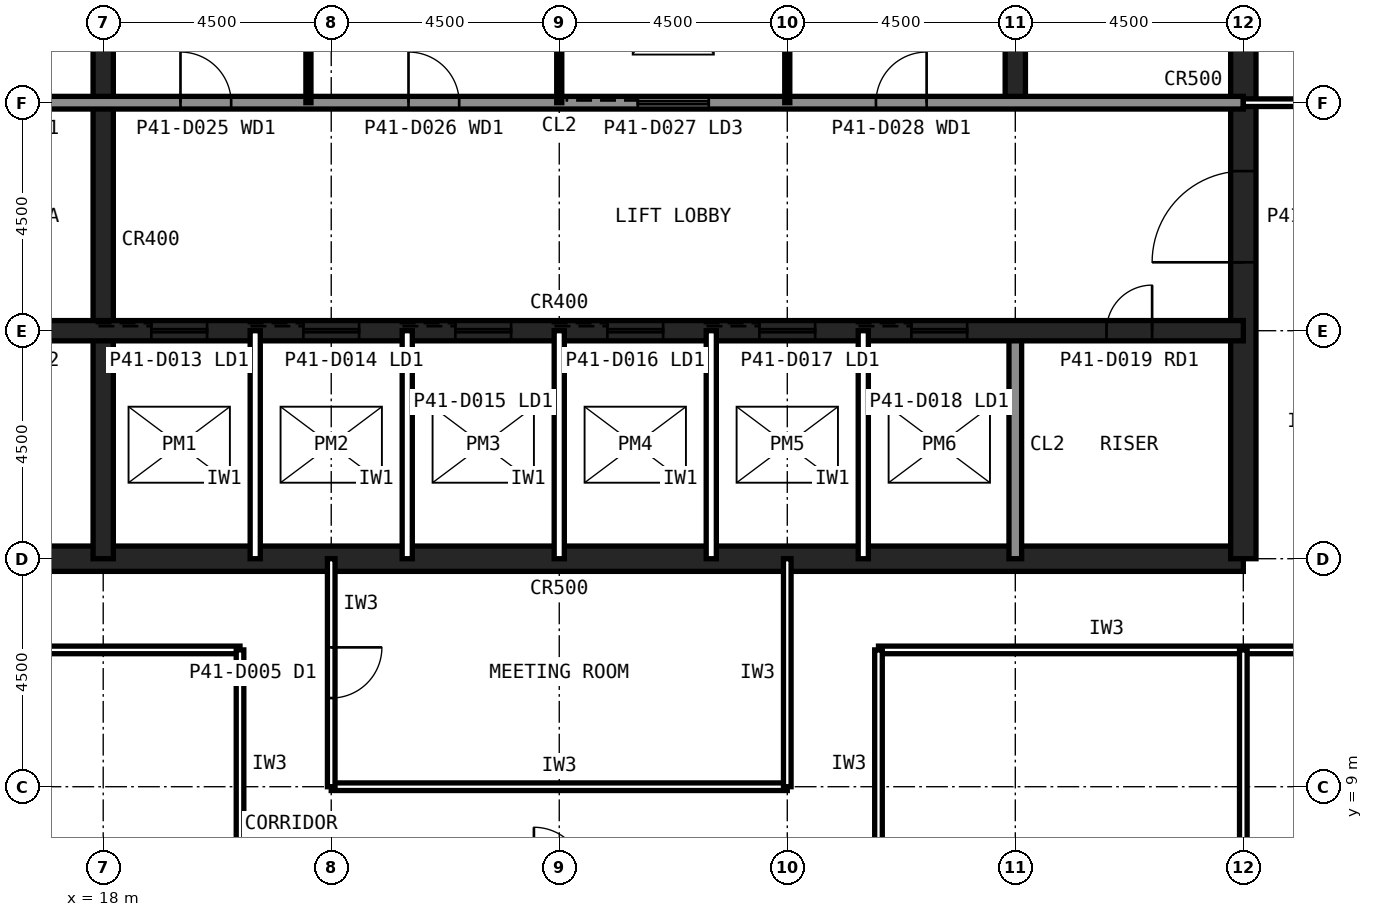
"""IFC4 building model, lengths in metres.
Left out: names, types, materials, properties, quantities, classifications, styles, units other than length and angle.
Written with IfcOpenShell. Run it as: python <this file> out.ifc"""

import sys

from ifc_helpers import new_model, si_unit, direction, frame, frame_2d, origin, place, context, subcontext, project, spatial, rectangle, extrude, element, fill, save


model = new_model("IFC4")
c1 = context("Model", 3, precision=1e-05, world=origin(), true_north=direction((0.0, 1.0)))
c2 = subcontext(c1, "Body", "Model", "MODEL_VIEW")
j1 = project(units=[si_unit("LENGTHUNIT", "METRE"), si_unit("PLANEANGLEUNIT", "RADIAN")], contexts=[c1])
p1 = place(None, origin())
s1 = spatial("IfcSite", under=j1, at=p1, CompositionType="ELEMENT")
p2 = place(p1, origin())
s2 = spatial("IfcBuilding", under=s1, at=p2, CompositionType="ELEMENT")
p3 = place(p2, frame((0.0, 0.0, 175.6)))
s3 = spatial("IfcBuildingStorey", under=s2, at=p3, CompositionType="ELEMENT", Elevation=175.6)
p4 = place(p3, frame((13.5, 13.5, 0.0), z_axis=(0.0, 0.0, 1.0), x_axis=(1.0, 0.0, 0.0)))
e1 = element("IfcWall", 1, at=p4, inside=s3, PredefinedType="SHEAR", context=c2, shape_type="SweptSolid", body=[
    extrude(rectangle(XDim=27.0, YDim=0.5, at=frame_2d((13.5, 0.0))), origin(), (0.0, 0.0, 1.0), 4.0),
])
p5 = place(p3, frame((40.5, 13.5, 0.0), z_axis=(0.0, 0.0, 1.0), x_axis=(0.0, 1.0, 0.0)))
e2 = element("IfcWall", 2, at=p5, inside=s3, PredefinedType="SHEAR", context=c2, shape_type="SweptSolid", body=[
    extrude(rectangle(XDim=27.0, YDim=0.5, at=frame_2d((13.5, 0.0))), origin(), (0.0, 0.0, 1.0), 4.0),
])
p6 = place(p5, frame((5.85, 0.0, 0.0)))
e3 = element("IfcOpeningElement", 3, at=p6, cuts=e2, PredefinedType="OPENING", context=c2, shape_type="SweptSolid", body=[
    extrude(rectangle(XDim=1.8, YDim=2.1, at=frame_2d((0.9, 1.05))), frame((0.0, 0.26, 0.0), z_axis=(0.0, -1.0, 0.0), x_axis=(1.0, 0.0, 0.0)), (0.0, 0.0, 1.0), 0.52),
])
p7 = place(p5, frame((19.65, 0.0, 0.0)))
e4 = element("IfcOpeningElement", 4, at=p7, cuts=e2, PredefinedType="OPENING", context=c2, shape_type="SweptSolid", body=[
    extrude(rectangle(XDim=1.2, YDim=2.1, at=frame_2d((0.6, 1.05))), frame((0.0, 0.26, 0.0), z_axis=(0.0, -1.0, 0.0), x_axis=(1.0, 0.0, 0.0)), (0.0, 0.0, 1.0), 0.52),
])
p8 = place(p3, frame((18.0, 13.5, 0.0), z_axis=(0.0, 0.0, 1.0), x_axis=(0.0, 1.0, 0.0)))
e5 = element("IfcWall", 5, at=p8, inside=s3, PredefinedType="SHEAR", context=c2, shape_type="SweptSolid", body=[
    extrude(rectangle(XDim=18.0, YDim=0.4, at=frame_2d((9.0, 0.0))), origin(), (0.0, 0.0, 1.0), 4.0),
])
p9 = place(p3, frame((36.0, 13.5, 0.0), z_axis=(0.0, 0.0, 1.0), x_axis=(0.0, 1.0, 0.0)))
e6 = element("IfcWall", 6, at=p9, inside=s3, PredefinedType="SOLIDWALL", context=c2, shape_type="SweptSolid", body=[
    extrude(rectangle(XDim=4.5, YDim=0.25, at=frame_2d((2.25, 0.0))), origin(), (0.0, 0.0, 1.0), 3.84),
])
p10 = place(p3, frame((36.0, 22.5, 0.0), z_axis=(0.0, 0.0, 1.0), x_axis=(0.0, 1.0, 0.0)))
e7 = element("IfcWall", 7, at=p10, inside=s3, PredefinedType="SHEAR", context=c2, shape_type="SweptSolid", body=[
    extrude(rectangle(XDim=18.0, YDim=0.4, at=frame_2d((9.0, 0.0))), origin(), (0.0, 0.0, 1.0), 4.0),
])
p11 = place(p3, frame((13.5, 18.0, 0.0), z_axis=(0.0, 0.0, 1.0), x_axis=(1.0, 0.0, 0.0)))
e8 = element("IfcWall", 8, at=p11, inside=s3, PredefinedType="SHEAR", context=c2, shape_type="SweptSolid", body=[
    extrude(rectangle(XDim=27.0, YDim=0.4, at=frame_2d((13.5, 0.0))), origin(), (0.0, 0.0, 1.0), 4.0),
])
p12 = place(p11, frame((24.3, 0.0, 0.0)))
e9 = element("IfcOpeningElement", 9, at=p12, cuts=e8, PredefinedType="OPENING", context=c2, shape_type="SweptSolid", body=[
    extrude(rectangle(XDim=0.9, YDim=2.1, at=frame_2d((0.45, 1.05))), frame((0.0, 0.21, 0.0), z_axis=(0.0, -1.0, 0.0), x_axis=(1.0, 0.0, 0.0)), (0.0, 0.0, 1.0), 0.42),
])
p13 = place(p11, frame((5.45, 0.0, 0.0)))
e10 = element("IfcOpeningElement", 10, at=p13, cuts=e8, PredefinedType="OPENING", context=c2, shape_type="SweptSolid", body=[
    extrude(rectangle(XDim=1.1, YDim=2.1, at=frame_2d((0.55, 1.05))), frame((0.0, 0.21, 0.0), z_axis=(0.0, -1.0, 0.0), x_axis=(1.0, 0.0, 0.0)), (0.0, 0.0, 1.0), 0.42),
])
p14 = place(p11, frame((8.45, 0.0, 0.0)))
e11 = element("IfcOpeningElement", 11, at=p14, cuts=e8, PredefinedType="OPENING", context=c2, shape_type="SweptSolid", body=[
    extrude(rectangle(XDim=1.1, YDim=2.1, at=frame_2d((0.55, 1.05))), frame((0.0, 0.21, 0.0), z_axis=(0.0, -1.0, 0.0), x_axis=(1.0, 0.0, 0.0)), (0.0, 0.0, 1.0), 0.42),
])
p15 = place(p11, frame((11.45, 0.0, 0.0)))
e12 = element("IfcOpeningElement", 12, at=p15, cuts=e8, PredefinedType="OPENING", context=c2, shape_type="SweptSolid", body=[
    extrude(rectangle(XDim=1.1, YDim=2.1, at=frame_2d((0.55, 1.05))), frame((0.0, 0.21, 0.0), z_axis=(0.0, -1.0, 0.0), x_axis=(1.0, 0.0, 0.0)), (0.0, 0.0, 1.0), 0.42),
])
p16 = place(p11, frame((14.45, 0.0, 0.0)))
e13 = element("IfcOpeningElement", 13, at=p16, cuts=e8, PredefinedType="OPENING", context=c2, shape_type="SweptSolid", body=[
    extrude(rectangle(XDim=1.1, YDim=2.1, at=frame_2d((0.55, 1.05))), frame((0.0, 0.21, 0.0), z_axis=(0.0, -1.0, 0.0), x_axis=(1.0, 0.0, 0.0)), (0.0, 0.0, 1.0), 0.42),
])
p17 = place(p11, frame((17.45, 0.0, 0.0)))
e14 = element("IfcOpeningElement", 14, at=p17, cuts=e8, PredefinedType="OPENING", context=c2, shape_type="SweptSolid", body=[
    extrude(rectangle(XDim=1.1, YDim=2.1, at=frame_2d((0.55, 1.05))), frame((0.0, 0.21, 0.0), z_axis=(0.0, -1.0, 0.0), x_axis=(1.0, 0.0, 0.0)), (0.0, 0.0, 1.0), 0.42),
])
p18 = place(p11, frame((20.45, 0.0, 0.0)))
e15 = element("IfcOpeningElement", 15, at=p18, cuts=e8, PredefinedType="OPENING", context=c2, shape_type="SweptSolid", body=[
    extrude(rectangle(XDim=1.1, YDim=2.1, at=frame_2d((0.55, 1.05))), frame((0.0, 0.21, 0.0), z_axis=(0.0, -1.0, 0.0), x_axis=(1.0, 0.0, 0.0)), (0.0, 0.0, 1.0), 0.42),
])
p19 = place(p11, frame((1.6, 0.0, 0.0)))
e16 = element("IfcOpeningElement", 16, at=p19, cuts=e8, PredefinedType="OPENING", context=c2, shape_type="SweptSolid", body=[
    extrude(rectangle(XDim=1.3, YDim=2.2, at=frame_2d((0.65, 1.1))), frame((0.0, 0.21, 0.0), z_axis=(0.0, -1.0, 0.0), x_axis=(1.0, 0.0, 0.0)), (0.0, 0.0, 1.0), 0.42),
])
p20 = place(p3, frame((13.5, 22.5, 0.0), z_axis=(0.0, 0.0, 1.0), x_axis=(1.0, 0.0, 0.0)))
e17 = element("IfcWall", 17, at=p20, inside=s3, PredefinedType="SOLIDWALL", context=c2, shape_type="SweptSolid", body=[
    extrude(rectangle(XDim=27.0, YDim=0.25, at=frame_2d((13.5, 0.0))), origin(), (0.0, 0.0, 1.0), 3.84),
])
p21 = place(p20, frame((1.65, 0.0, 0.0)))
e18 = element("IfcOpeningElement", 18, at=p21, cuts=e17, PredefinedType="OPENING", context=c2, shape_type="SweptSolid", body=[
    extrude(rectangle(XDim=1.2, YDim=2.1, at=frame_2d((0.6, 1.05))), frame((0.0, 0.135, 0.0), z_axis=(0.0, -1.0, 0.0), x_axis=(1.0, 0.0, 0.0)), (0.0, 0.0, 1.0), 0.27),
])
p22 = place(p20, frame((6.025, 0.0, 0.0)))
e19 = element("IfcOpeningElement", 19, at=p22, cuts=e17, PredefinedType="OPENING", context=c2, shape_type="SweptSolid", body=[
    extrude(rectangle(XDim=1.0, YDim=2.1, at=frame_2d((0.5, 1.05))), frame((0.0, 0.135, 0.0), z_axis=(0.0, -1.0, 0.0), x_axis=(1.0, 0.0, 0.0)), (0.0, 0.0, 1.0), 0.27),
])
p23 = place(p20, frame((10.525, 0.0, 0.0)))
e20 = element("IfcOpeningElement", 20, at=p23, cuts=e17, PredefinedType="OPENING", context=c2, shape_type="SweptSolid", body=[
    extrude(rectangle(XDim=1.0, YDim=2.1, at=frame_2d((0.5, 1.05))), frame((0.0, 0.135, 0.0), z_axis=(0.0, -1.0, 0.0), x_axis=(1.0, 0.0, 0.0)), (0.0, 0.0, 1.0), 0.27),
])
p24 = place(p20, frame((19.75, 0.0, 0.0)))
e21 = element("IfcOpeningElement", 21, at=p24, cuts=e17, PredefinedType="OPENING", context=c2, shape_type="SweptSolid", body=[
    extrude(rectangle(XDim=1.0, YDim=2.1, at=frame_2d((0.5, 1.05))), frame((0.0, 0.135, 0.0), z_axis=(0.0, -1.0, 0.0), x_axis=(1.0, 0.0, 0.0)), (0.0, 0.0, 1.0), 0.27),
])
p25 = place(p20, frame((15.05, 0.0, 0.0)))
e22 = element("IfcOpeningElement", 22, at=p25, cuts=e17, PredefinedType="OPENING", context=c2, shape_type="SweptSolid", body=[
    extrude(rectangle(XDim=1.4, YDim=2.4, at=frame_2d((0.7, 1.2))), frame((0.0, 0.135, 0.0), z_axis=(0.0, -1.0, 0.0), x_axis=(1.0, 0.0, 0.0)), (0.0, 0.0, 1.0), 0.27),
])
for number, where, z_axis, x_axis in (
    (23, (21.0, 13.5, 0.0), (0.0, 0.0, 1.0), (0.0, 1.0, 0.0)),
    (24, (24.0, 13.5, 0.0), (0.0, 0.0, 1.0), (0.0, 1.0, 0.0)),
    (25, (27.0, 13.5, 0.0), (0.0, 0.0, 1.0), (0.0, 1.0, 0.0)),
    (26, (30.0, 13.5, 0.0), (0.0, 0.0, 1.0), (0.0, 1.0, 0.0)),
    (27, (33.0, 13.5, 0.0), (0.0, 0.0, 1.0), (0.0, 1.0, 0.0)),
):
    element("IfcWall", number, at=place(p3, frame(where, z_axis=z_axis, x_axis=x_axis)), inside=s3, PredefinedType="PARTITIONING", context=c2, shape_type="SweptSolid", body=[
        extrude(rectangle(XDim=4.5, YDim=0.2, at=frame_2d((2.25, 0.0))), origin(), (0.0, 0.0, 1.0), 3.84),
    ])
for number, where, z_axis, x_axis in (
    (28, (22.05, 22.5, 0.0), (0.0, 0.0, 1.0), (0.0, 1.0, 0.0)),
    (29, (27.0, 22.5, 0.0), (0.0, 0.0, 1.0), (0.0, 1.0, 0.0)),
    (30, (31.5, 22.5, 0.0), (0.0, 0.0, 1.0), (0.0, 1.0, 0.0)),
):
    element("IfcWall", number, at=place(p3, frame(where, z_axis=z_axis, x_axis=x_axis)), inside=s3, PredefinedType="PLUMBINGWALL", context=c2, shape_type="SweptSolid", body=[
        extrude(rectangle(XDim=9.0, YDim=0.1, at=frame_2d((4.5, 0.0))), origin(), (0.0, 0.0, 1.0), 3.84),
    ])
for number, where, z_axis, x_axis in (
    (31, (11.7, 11.7, 0.0), (0.0, 0.0, 1.0), (1.0, 0.0, 0.0)),
    (32, (33.3, 11.7, 0.0), (0.0, 0.0, 1.0), (1.0, 0.0, 0.0)),
):
    element("IfcWall", number, at=place(p3, frame(where, z_axis=z_axis, x_axis=x_axis)), inside=s3, PredefinedType="PARTITIONING", context=c2, shape_type="SweptSolid", body=[
        extrude(rectangle(XDim=9.0, YDim=0.15, at=frame_2d((4.5, 0.0))), origin(), (0.0, 0.0, 1.0), 3.84),
    ])
for number, where, z_axis, x_axis in (
    (33, (20.7, 11.7, 0.0), (0.0, 0.0, 1.0), (0.0, -1.0, 0.0)),
    (34, (33.3, 7.2, 0.0), (0.0, 0.0, 1.0), (0.0, 1.0, 0.0)),
):
    element("IfcWall", number, at=place(p3, frame(where, z_axis=z_axis, x_axis=x_axis)), inside=s3, PredefinedType="PARTITIONING", context=c2, shape_type="SweptSolid", body=[
        extrude(rectangle(XDim=4.5, YDim=0.15, at=frame_2d((2.25, 0.0))), origin(), (0.0, 0.0, 1.0), 3.84),
    ])
p26 = place(p3, frame((22.5, 9.0, 0.0), z_axis=(0.0, 0.0, 1.0), x_axis=(1.0, 0.0, 0.0)))
e35 = element("IfcWall", 35, at=p26, inside=s3, PredefinedType="PARTITIONING", context=c2, shape_type="SweptSolid", body=[
    extrude(rectangle(XDim=9.0, YDim=0.15, at=frame_2d((4.5, 0.0))), origin(), (0.0, 0.0, 1.0), 3.84),
])
p27 = place(p3, frame((31.5, 9.0, 0.0), z_axis=(0.0, 0.0, 1.0), x_axis=(0.0, 1.0, 0.0)))
e36 = element("IfcWall", 36, at=p27, inside=s3, PredefinedType="PARTITIONING", context=c2, shape_type="SweptSolid", body=[
    extrude(rectangle(XDim=4.5, YDim=0.15, at=frame_2d((2.25, 0.0))), origin(), (0.0, 0.0, 1.0), 2.989),
])
p28 = place(p3, frame((22.5, 13.5, 0.0), z_axis=(0.0, 0.0, 1.0), x_axis=(0.0, -1.0, 0.0)))
e37 = element("IfcWall", 37, at=p28, inside=s3, PredefinedType="PARTITIONING", context=c2, shape_type="SweptSolid", body=[
    extrude(rectangle(XDim=4.5, YDim=0.15, at=frame_2d((2.25, 0.0))), origin(), (0.0, 0.0, 1.0), 2.989),
])
p29 = place(p28, frame((1.75, 0.0, 0.0)))
e38 = element("IfcOpeningElement", 38, at=p29, cuts=e37, PredefinedType="OPENING", context=c2, shape_type="SweptSolid", body=[
    extrude(rectangle(XDim=1.0, YDim=2.1, at=frame_2d((0.5, 1.05))), frame((0.0, 0.085, 0.0), z_axis=(0.0, -1.0, 0.0), x_axis=(1.0, 0.0, 0.0)), (0.0, 0.0, 1.0), 0.17),
])
p30 = place(p3, frame((40.5, 22.5, 0.0), z_axis=(0.0, 0.0, 1.0), x_axis=(1.0, 0.0, 0.0)))
e39 = element("IfcWall", 39, at=p30, inside=s3, PredefinedType="PARTITIONING", context=c2, shape_type="SweptSolid", body=[
    extrude(rectangle(XDim=3.0, YDim=0.15, at=frame_2d((1.5, 0.0))), origin(), (0.0, 0.0, 1.0), 2.989),
])
p31 = place(p3, frame((40.5, 0.395, 0.0), z_axis=(0.0, 0.0, 1.0), x_axis=(0.0, 1.0, 0.0)))
e40 = element("IfcWall", 40, at=p31, inside=s3, PredefinedType="PARTITIONING", context=c2, shape_type="SweptSolid", body=[
    extrude(rectangle(XDim=11.305, YDim=0.15, at=frame_2d((5.652, 0.0))), origin(), (0.0, 0.0, 1.0), 2.989),
])
p32 = place(p31, frame((5.153, 0.0, 0.0)))
e41 = element("IfcOpeningElement", 41, at=p32, cuts=e40, PredefinedType="OPENING", context=c2, shape_type="SweptSolid", body=[
    extrude(rectangle(XDim=1.0, YDim=2.1, at=frame_2d((0.5, 1.05))), frame((0.0, 0.085, 0.0), z_axis=(0.0, -1.0, 0.0), x_axis=(1.0, 0.0, 0.0)), (0.0, 0.0, 1.0), 0.17),
])
p33 = place(p6, origin())
e42 = element("IfcDoor", 42, at=p33, inside=s3, OperationType="SINGLE_SWING_LEFT", PredefinedType="DOOR", context=c2, shape_type="SweptSolid", body=[
    extrude(rectangle(XDim=1.8, YDim=2.1, at=frame_2d((0.9, 1.05))), frame((0.0, 0.025, 0.0), z_axis=(0.0, -1.0, 0.0), x_axis=(1.0, 0.0, 0.0)), (0.0, 0.0, 1.0), 0.05),
])
fill(e3, e42)
p34 = place(p22, origin())
e43 = element("IfcDoor", 43, at=p34, inside=s3, OperationType="SINGLE_SWING_LEFT", PredefinedType="DOOR", context=c2, shape_type="SweptSolid", body=[
    extrude(rectangle(XDim=1.0, YDim=2.1, at=frame_2d((0.5, 1.05))), frame((0.0, 0.025, 0.0), z_axis=(0.0, -1.0, 0.0), x_axis=(1.0, 0.0, 0.0)), (0.0, 0.0, 1.0), 0.05),
])
fill(e19, e43)
p35 = place(p23, origin())
e44 = element("IfcDoor", 44, at=p35, inside=s3, OperationType="SINGLE_SWING_LEFT", PredefinedType="DOOR", context=c2, shape_type="SweptSolid", body=[
    extrude(rectangle(XDim=1.0, YDim=2.1, at=frame_2d((0.5, 1.05))), frame((0.0, 0.025, 0.0), z_axis=(0.0, -1.0, 0.0), x_axis=(1.0, 0.0, 0.0)), (0.0, 0.0, 1.0), 0.05),
])
fill(e20, e44)
p36 = place(p24, origin())
e45 = element("IfcDoor", 45, at=p36, inside=s3, OperationType="SINGLE_SWING_RIGHT", PredefinedType="DOOR", context=c2, shape_type="SweptSolid", body=[
    extrude(rectangle(XDim=1.0, YDim=2.1, at=frame_2d((0.5, 1.05))), frame((0.0, 0.025, 0.0), z_axis=(0.0, -1.0, 0.0), x_axis=(1.0, 0.0, 0.0)), (0.0, 0.0, 1.0), 0.05),
])
fill(e21, e45)
p37 = place(p12, origin())
e46 = element("IfcDoor", 46, at=p37, inside=s3, OperationType="SINGLE_SWING_RIGHT", PredefinedType="DOOR", context=c2, shape_type="SweptSolid", body=[
    extrude(rectangle(XDim=0.9, YDim=2.1, at=frame_2d((0.45, 1.05))), frame((0.0, 0.025, 0.0), z_axis=(0.0, -1.0, 0.0), x_axis=(1.0, 0.0, 0.0)), (0.0, 0.0, 1.0), 0.05),
])
fill(e9, e46)
p38 = place(p13, origin())
e47 = element("IfcDoor", 47, at=p38, inside=s3, OperationType="SLIDING_TO_LEFT", PredefinedType="DOOR", context=c2, shape_type="SweptSolid", body=[
    extrude(rectangle(XDim=1.1, YDim=2.1, at=frame_2d((0.55, 1.05))), frame((0.0, 0.025, 0.0), z_axis=(0.0, -1.0, 0.0), x_axis=(1.0, 0.0, 0.0)), (0.0, 0.0, 1.0), 0.05),
])
fill(e10, e47)
p39 = place(p14, origin())
e48 = element("IfcDoor", 48, at=p39, inside=s3, OperationType="SLIDING_TO_LEFT", PredefinedType="DOOR", context=c2, shape_type="SweptSolid", body=[
    extrude(rectangle(XDim=1.1, YDim=2.1, at=frame_2d((0.55, 1.05))), frame((0.0, 0.025, 0.0), z_axis=(0.0, -1.0, 0.0), x_axis=(1.0, 0.0, 0.0)), (0.0, 0.0, 1.0), 0.05),
])
fill(e11, e48)
p40 = place(p15, origin())
e49 = element("IfcDoor", 49, at=p40, inside=s3, OperationType="SLIDING_TO_LEFT", PredefinedType="DOOR", context=c2, shape_type="SweptSolid", body=[
    extrude(rectangle(XDim=1.1, YDim=2.1, at=frame_2d((0.55, 1.05))), frame((0.0, 0.025, 0.0), z_axis=(0.0, -1.0, 0.0), x_axis=(1.0, 0.0, 0.0)), (0.0, 0.0, 1.0), 0.05),
])
fill(e12, e49)
p41 = place(p16, origin())
e50 = element("IfcDoor", 50, at=p41, inside=s3, OperationType="SLIDING_TO_LEFT", PredefinedType="DOOR", context=c2, shape_type="SweptSolid", body=[
    extrude(rectangle(XDim=1.1, YDim=2.1, at=frame_2d((0.55, 1.05))), frame((0.0, 0.025, 0.0), z_axis=(0.0, -1.0, 0.0), x_axis=(1.0, 0.0, 0.0)), (0.0, 0.0, 1.0), 0.05),
])
fill(e13, e50)
p42 = place(p17, origin())
e51 = element("IfcDoor", 51, at=p42, inside=s3, OperationType="SLIDING_TO_LEFT", PredefinedType="DOOR", context=c2, shape_type="SweptSolid", body=[
    extrude(rectangle(XDim=1.1, YDim=2.1, at=frame_2d((0.55, 1.05))), frame((0.0, 0.025, 0.0), z_axis=(0.0, -1.0, 0.0), x_axis=(1.0, 0.0, 0.0)), (0.0, 0.0, 1.0), 0.05),
])
fill(e14, e51)
p43 = place(p18, origin())
e52 = element("IfcDoor", 52, at=p43, inside=s3, OperationType="SLIDING_TO_LEFT", PredefinedType="DOOR", context=c2, shape_type="SweptSolid", body=[
    extrude(rectangle(XDim=1.1, YDim=2.1, at=frame_2d((0.55, 1.05))), frame((0.0, 0.025, 0.0), z_axis=(0.0, -1.0, 0.0), x_axis=(1.0, 0.0, 0.0)), (0.0, 0.0, 1.0), 0.05),
])
fill(e15, e52)
p44 = place(p25, origin())
e53 = element("IfcDoor", 53, at=p44, inside=s3, OperationType="SLIDING_TO_LEFT", PredefinedType="DOOR", context=c2, shape_type="SweptSolid", body=[
    extrude(rectangle(XDim=1.4, YDim=2.4, at=frame_2d((0.7, 1.2))), frame((0.0, 0.025, 0.0), z_axis=(0.0, -1.0, 0.0), x_axis=(1.0, 0.0, 0.0)), (0.0, 0.0, 1.0), 0.05),
])
fill(e22, e53)
p45 = place(p29, origin())
e54 = element("IfcDoor", 54, at=p45, inside=s3, OperationType="SINGLE_SWING_LEFT", PredefinedType="DOOR", context=c2, shape_type="SweptSolid", body=[
    extrude(rectangle(XDim=1.0, YDim=2.1, at=frame_2d((0.5, 1.05))), frame((0.0, 0.025, 0.0), z_axis=(0.0, -1.0, 0.0), x_axis=(1.0, 0.0, 0.0)), (0.0, 0.0, 1.0), 0.05),
])
fill(e38, e54)
save(model, sys.argv[1])
